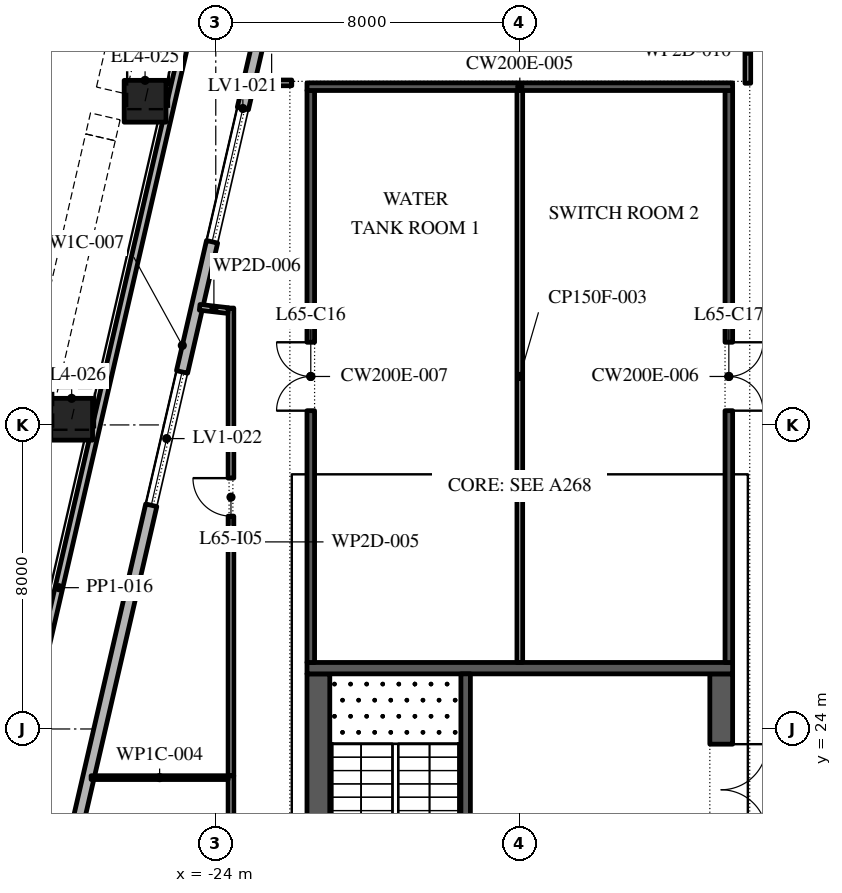
"""IFC4 building model, lengths in metres.
Left out: names, types, materials, properties, quantities, classifications, styles, units other than length and angle.
Written with IfcOpenShell. Run it as: python <this file> out.ifc"""

import sys

from ifc_helpers import new_model, si_unit, direction, frame, frame_2d, origin, origin_2d, place, context, subcontext, project, spatial, rectangle, extrude, element, fill, save


model = new_model("IFC4")
c1 = context("Model", 3, precision=1e-05, world=origin(), true_north=direction((0.0, 1.0)))
c2 = subcontext(c1, "Body", "Model", "MODEL_VIEW")
j1 = project(units=[si_unit("LENGTHUNIT", "METRE"), si_unit("PLANEANGLEUNIT", "RADIAN")], contexts=[c1])
p1 = place(None, origin())
s1 = spatial("IfcSite", under=j1, at=p1, CompositionType="ELEMENT")
p2 = place(p1, origin())
s2 = spatial("IfcBuilding", under=s1, at=p2, CompositionType="ELEMENT")
p3 = place(p2, frame((0.0, 0.0, 297.6)))
s3 = spatial("IfcBuildingStorey", under=s2, at=p3, CompositionType="ELEMENT", Elevation=297.6)
p4 = place(p3, frame((-25.86, 40.517, 0.0), z_axis=(0.014572775968, 0.063163734844, 0.997896776626), x_axis=(-0.974402924741, 0.22480867478, 0.0)))
e1 = element("IfcColumn", 1, at=p4, inside=s3, PredefinedType="COLUMN", context=c2, shape_type="SweptSolid", body=[
    extrude(rectangle(XDim=1.1, YDim=1.1, at=origin_2d()), origin(), (0.0, 0.0, 1.0), 5.411),
])
p5 = place(p3, frame((-27.792, 32.15, 0.0), z_axis=(0.011648990657, 0.050569261768, 0.998652617671), x_axis=(-0.974479105773, 0.22447822258, 0.0)))
e2 = element("IfcColumn", 2, at=p5, inside=s3, PredefinedType="COLUMN", context=c2, shape_type="SweptSolid", body=[
    extrude(rectangle(XDim=1.1, YDim=1.1, at=origin_2d()), origin(), (0.0, 0.0, 1.0), 5.407),
])
p6 = place(p3, frame((29.616, 40.758, 0.0), z_axis=(0.0, 0.0, 1.0), x_axis=(-0.974370532314, 0.224949029246, 0.0)))
e3 = element("IfcWall", 3, at=p6, inside=s3, PredefinedType="STANDARD", context=c2, shape_type="SweptSolid", body=[
    extrude(rectangle(XDim=48.0, YDim=0.3, at=frame_2d((24.0, 0.0))), origin(), (0.0, 0.0, 1.0), 4.95),
])
p7 = place(p6, frame((2.075, 0.0, 0.6)))
e4 = element("IfcOpeningElement", 4, at=p7, cuts=e3, PredefinedType="OPENING", context=c2, shape_type="SweptSolid", body=[
    extrude(rectangle(XDim=3.6, YDim=3.9, at=frame_2d((1.8, 1.95))), frame((0.0, 0.16, 0.0), z_axis=(0.0, -1.0, 0.0), x_axis=(1.0, 0.0, 0.0)), (0.0, 0.0, 1.0), 0.32),
])
p8 = place(p6, frame((9.975, 0.0, 0.6)))
e5 = element("IfcOpeningElement", 5, at=p8, cuts=e3, PredefinedType="OPENING", context=c2, shape_type="SweptSolid", body=[
    extrude(rectangle(XDim=3.6, YDim=3.55, at=frame_2d((1.8, 1.775))), frame((0.0, 0.16, 0.0), z_axis=(0.0, -1.0, 0.0), x_axis=(1.0, 0.0, 0.0)), (0.0, 0.0, 1.0), 0.32),
])
p9 = place(p6, frame((18.025, 0.0, 0.6)))
e6 = element("IfcOpeningElement", 6, at=p9, cuts=e3, PredefinedType="OPENING", context=c2, shape_type="SweptSolid", body=[
    extrude(rectangle(XDim=3.6, YDim=3.55, at=frame_2d((1.8, 1.775))), frame((0.0, 0.16, 0.0), z_axis=(0.0, -1.0, 0.0), x_axis=(1.0, 0.0, 0.0)), (0.0, 0.0, 1.0), 0.32),
])
p10 = place(p6, frame((26.075, 0.0, 0.6)))
e7 = element("IfcOpeningElement", 7, at=p10, cuts=e3, PredefinedType="OPENING", context=c2, shape_type="SweptSolid", body=[
    extrude(rectangle(XDim=3.6, YDim=3.9, at=frame_2d((1.8, 1.95))), frame((0.0, 0.16, 0.0), z_axis=(0.0, -1.0, 0.0), x_axis=(1.0, 0.0, 0.0)), (0.0, 0.0, 1.0), 0.32),
])
p11 = place(p6, frame((34.125, 0.0, 0.6)))
e8 = element("IfcOpeningElement", 8, at=p11, cuts=e3, PredefinedType="OPENING", context=c2, shape_type="SweptSolid", body=[
    extrude(rectangle(XDim=3.6, YDim=3.55, at=frame_2d((1.8, 1.775))), frame((0.0, 0.16, 0.0), z_axis=(0.0, -1.0, 0.0), x_axis=(1.0, 0.0, 0.0)), (0.0, 0.0, 1.0), 0.32),
])
p12 = place(p6, frame((42.175, 0.0, 0.6)))
e9 = element("IfcOpeningElement", 9, at=p12, cuts=e3, PredefinedType="OPENING", context=c2, shape_type="SweptSolid", body=[
    extrude(rectangle(XDim=3.6, YDim=3.9, at=frame_2d((1.8, 1.95))), frame((0.0, 0.16, 0.0), z_axis=(0.0, -1.0, 0.0), x_axis=(1.0, 0.0, 0.0)), (0.0, 0.0, 1.0), 0.32),
])
p13 = place(p3, frame((-21.359, 48.678, 0.0), z_axis=(0.0, 0.0, 1.0), x_axis=(-0.224949219336, -0.974370488428, 0.0)))
e10 = element("IfcWall", 10, at=p13, inside=s3, PredefinedType="STANDARD", context=c2, shape_type="SweptSolid", body=[
    extrude(rectangle(XDim=30.011, YDim=0.3, at=frame_2d((15.006, 0.0))), origin(), (0.0, 0.0, 1.0), 4.95),
])
p14 = place(p13, frame((1.607, 0.0, 0.6)))
e11 = element("IfcOpeningElement", 11, at=p14, cuts=e10, PredefinedType="OPENING", context=c2, shape_type="SweptSolid", body=[
    extrude(rectangle(XDim=3.6, YDim=3.9, at=frame_2d((1.8, 1.95))), frame((0.0, 0.16, 0.0), z_axis=(0.0, -1.0, 0.0), x_axis=(1.0, 0.0, 0.0)), (0.0, 0.0, 1.0), 0.32),
])
p15 = place(p13, frame((8.571, 0.0, 0.6)))
e12 = element("IfcOpeningElement", 12, at=p15, cuts=e10, PredefinedType="OPENING", context=c2, shape_type="SweptSolid", body=[
    extrude(rectangle(XDim=3.6, YDim=3.9, at=frame_2d((1.8, 1.95))), frame((0.0, 0.16, 0.0), z_axis=(0.0, -1.0, 0.0), x_axis=(1.0, 0.0, 0.0)), (0.0, 0.0, 1.0), 0.32),
])
p16 = place(p13, frame((15.686, 0.0, 0.6)))
e13 = element("IfcOpeningElement", 13, at=p16, cuts=e10, PredefinedType="OPENING", context=c2, shape_type="SweptSolid", body=[
    extrude(rectangle(XDim=3.6, YDim=3.9, at=frame_2d((1.8, 1.95))), frame((0.0, 0.16, 0.0), z_axis=(0.0, -1.0, 0.0), x_axis=(1.0, 0.0, 0.0)), (0.0, 0.0, 1.0), 0.32),
])
p17 = place(p3, frame((-21.517, 56.35, -0.05), z_axis=(0.0, 0.0, 1.0), x_axis=(-0.224951435492, -0.97436997679, 0.0)))
e14 = element("IfcWall", 14, at=p17, inside=s3, PredefinedType="STANDARD", context=c2, shape_type="SweptSolid", body=[
    extrude(rectangle(XDim=58.769, YDim=0.2, at=frame_2d((29.385, 0.0))), origin(), (0.0, 0.0, 1.0), 1.1),
])
p18 = place(p3, frame((-21.3, -2.45, 0.0), z_axis=(0.0, 0.0, 1.0), x_axis=(0.0, 1.0, 0.0)))
e15 = element("IfcWall", 15, at=p18, inside=s3, PredefinedType="SHEAR", context=c2, shape_type="SweptSolid", body=[
    extrude(rectangle(XDim=27.9, YDim=0.6, at=frame_2d((13.95, 0.0))), origin(), (0.0, 0.0, 1.0), 4.95),
])
p19 = place(p18, frame((5.05, 0.0, 0.0)))
e16 = element("IfcOpeningElement", 16, at=p19, cuts=e15, PredefinedType="OPENING", context=c2, shape_type="SweptSolid", body=[
    extrude(rectangle(XDim=1.2, YDim=2.1, at=frame_2d((0.6, 1.05))), frame((0.0, 0.31, 0.0), z_axis=(0.0, -1.0, 0.0), x_axis=(1.0, 0.0, 0.0)), (0.0, 0.0, 1.0), 0.62),
])
p20 = place(p18, frame((21.65, 0.0, 0.0)))
e17 = element("IfcOpeningElement", 17, at=p20, cuts=e15, PredefinedType="OPENING", context=c2, shape_type="SweptSolid", body=[
    extrude(rectangle(XDim=1.2, YDim=2.1, at=frame_2d((0.6, 1.05))), frame((0.0, 0.31, 0.0), z_axis=(0.0, -1.0, 0.0), x_axis=(1.0, 0.0, 0.0)), (0.0, 0.0, 1.0), 0.62),
])
p21 = place(p3, frame((-10.7, -2.45, 0.0), z_axis=(0.0, 0.0, 1.0), x_axis=(0.0, 1.0, 0.0)))
e18 = element("IfcWall", 18, at=p21, inside=s3, PredefinedType="SHEAR", context=c2, shape_type="SweptSolid", body=[
    extrude(rectangle(XDim=27.9, YDim=0.6, at=frame_2d((13.95, 0.0))), origin(), (0.0, 0.0, 1.0), 4.95),
])
p22 = place(p21, frame((23.65, 0.0, 0.0)))
e19 = element("IfcOpeningElement", 19, at=p22, cuts=e18, PredefinedType="OPENING", context=c2, shape_type="SweptSolid", body=[
    extrude(rectangle(XDim=2.4, YDim=2.1, at=frame_2d((1.2, 1.05))), frame((0.0, 0.31, 0.0), z_axis=(0.0, -1.0, 0.0), x_axis=(1.0, 0.0, 0.0)), (0.0, 0.0, 1.0), 0.62),
])
p23 = place(p21, frame((0.938, 0.0, 0.0)))
e20 = element("IfcOpeningElement", 20, at=p23, cuts=e18, PredefinedType="OPENING", context=c2, shape_type="SweptSolid", body=[
    extrude(rectangle(XDim=1.8, YDim=2.4, at=frame_2d((0.9, 1.2))), frame((0.0, 0.31, 0.0), z_axis=(0.0, -1.0, 0.0), x_axis=(1.0, 0.0, 0.0)), (0.0, 0.0, 1.0), 0.62),
])
p24 = place(p21, frame((4.163, 0.0, 0.0)))
e21 = element("IfcOpeningElement", 21, at=p24, cuts=e18, PredefinedType="OPENING", context=c2, shape_type="SweptSolid", body=[
    extrude(rectangle(XDim=1.8, YDim=2.4, at=frame_2d((0.9, 1.2))), frame((0.0, 0.31, 0.0), z_axis=(0.0, -1.0, 0.0), x_axis=(1.0, 0.0, 0.0)), (0.0, 0.0, 1.0), 0.62),
])
p25 = place(p3, frame((-21.6, 25.6, 0.0), z_axis=(0.0, 0.0, 1.0), x_axis=(1.0, 0.0, 0.0)))
e22 = element("IfcWall", 22, at=p25, inside=s3, PredefinedType="SHEAR", context=c2, shape_type="SweptSolid", body=[
    extrude(rectangle(XDim=11.2, YDim=0.3, at=frame_2d((5.6, 0.0))), origin(), (0.0, 0.0, 1.0), 4.95),
])
p26 = place(p3, frame((-17.425, 19.15, 0.0), z_axis=(0.0, 0.0, 1.0), x_axis=(0.0, 1.0, 0.0)))
e23 = element("IfcWall", 23, at=p26, inside=s3, PredefinedType="SHEAR", context=c2, shape_type="SweptSolid", body=[
    extrude(rectangle(XDim=6.3, YDim=0.25, at=frame_2d((3.15, 0.0))), origin(), (0.0, 0.0, 1.0), 4.95),
])
p27 = place(p26, frame((0.05, 0.0, 0.0)))
e24 = element("IfcOpeningElement", 24, at=p27, cuts=e23, PredefinedType="OPENING", context=c2, shape_type="SweptSolid", body=[
    extrude(rectangle(XDim=1.2, YDim=2.1, at=frame_2d((0.6, 1.05))), frame((0.0, 0.135, 0.0), z_axis=(0.0, -1.0, 0.0), x_axis=(1.0, 0.0, 0.0)), (0.0, 0.0, 1.0), 0.27),
])
p28 = place(p3, frame((-21.5, 25.75, 0.0), z_axis=(0.0, 0.0, 1.0), x_axis=(0.0, 1.0, 0.0)))
e25 = element("IfcWall", 25, at=p28, inside=s3, PredefinedType="SHEAR", context=c2, shape_type="SweptSolid", body=[
    extrude(rectangle(XDim=15.05, YDim=0.2, at=frame_2d((7.525, 0.0))), origin(), (0.0, 0.0, 1.0), 4.95),
])
p29 = place(p28, frame((6.625, 0.0, 0.0)))
e26 = element("IfcOpeningElement", 26, at=p29, cuts=e25, PredefinedType="OPENING", context=c2, shape_type="SweptSolid", body=[
    extrude(rectangle(XDim=1.8, YDim=2.4, at=frame_2d((0.9, 1.2))), frame((0.0, 0.11, 0.0), z_axis=(0.0, -1.0, 0.0), x_axis=(1.0, 0.0, 0.0)), (0.0, 0.0, 1.0), 0.22),
])
p30 = place(p3, frame((-10.5, 25.75, 0.0), z_axis=(0.0, 0.0, 1.0), x_axis=(0.0, 1.0, 0.0)))
e27 = element("IfcWall", 27, at=p30, inside=s3, PredefinedType="SHEAR", context=c2, shape_type="SweptSolid", body=[
    extrude(rectangle(XDim=15.05, YDim=0.2, at=frame_2d((7.525, 0.0))), origin(), (0.0, 0.0, 1.0), 4.95),
])
p31 = place(p30, frame((6.625, 0.0, 0.0)))
e28 = element("IfcOpeningElement", 28, at=p31, cuts=e27, PredefinedType="OPENING", context=c2, shape_type="SweptSolid", body=[
    extrude(rectangle(XDim=1.8, YDim=2.4, at=frame_2d((0.9, 1.2))), frame((0.0, 0.11, 0.0), z_axis=(0.0, -1.0, 0.0), x_axis=(1.0, 0.0, 0.0)), (0.0, 0.0, 1.0), 0.22),
])
p32 = place(p3, frame((-21.6, 40.9, 0.0), z_axis=(0.0, 0.0, 1.0), x_axis=(1.0, 0.0, 0.0)))
e29 = element("IfcWall", 29, at=p32, inside=s3, PredefinedType="SHEAR", context=c2, shape_type="SweptSolid", body=[
    extrude(rectangle(XDim=11.2, YDim=0.2, at=frame_2d((5.6, 0.0))), origin(), (0.0, 0.0, 1.0), 4.95),
])
p33 = place(p3, frame((-16.0, 25.75, 0.0), z_axis=(0.0, 0.0, 1.0), x_axis=(0.0, 1.0, 0.0)))
e30 = element("IfcWall", 30, at=p33, inside=s3, PredefinedType="PARTITIONING", context=c2, shape_type="SweptSolid", body=[
    extrude(rectangle(XDim=15.05, YDim=0.15, at=frame_2d((7.525, 0.0))), origin(), (0.0, 0.0, 1.0), 4.95),
])
p34 = place(p3, frame((-23.6, 8.86, 0.0), z_axis=(0.0, 0.0, 1.0), x_axis=(0.0, 1.0, 0.0)))
e31 = element("IfcWall", 31, at=p34, inside=s3, PredefinedType="PARTITIONING", context=c2, shape_type="SweptSolid", body=[
    extrude(rectangle(XDim=13.91, YDim=0.15, at=frame_2d((6.955, 0.0))), origin(), (0.0, 0.0, 1.0), 4.95),
])
p35 = place(p34, frame((9.21, 0.0, 0.0)))
e32 = element("IfcOpeningElement", 32, at=p35, cuts=e31, PredefinedType="OPENING", context=c2, shape_type="SweptSolid", body=[
    extrude(rectangle(XDim=1.0, YDim=2.1, at=frame_2d((0.5, 1.05))), frame((0.0, 0.085, 0.0), z_axis=(0.0, -1.0, 0.0), x_axis=(1.0, 0.0, 0.0)), (0.0, 0.0, 1.0), 0.17),
])
p36 = place(p3, frame((-23.675, 22.72, 0.0), z_axis=(0.0, 0.0, 1.0), x_axis=(-1.0, 0.0, 0.0)))
e33 = element("IfcWall", 33, at=p36, inside=s3, PredefinedType="PARTITIONING", context=c2, shape_type="SweptSolid", body=[
    extrude(rectangle(XDim=3.605, YDim=0.1, at=frame_2d((1.802, 0.0))), origin(), (0.0, 0.0, 1.0), 4.95),
])
p37 = place(p3, frame((-23.6, 22.77, 0.0), z_axis=(0.0, 0.0, 1.0), x_axis=(0.0, 1.0, 0.0)))
e34 = element("IfcWall", 34, at=p37, inside=s3, PredefinedType="PARTITIONING", context=c2, shape_type="SweptSolid", body=[
    extrude(rectangle(XDim=12.305, YDim=0.15, at=frame_2d((6.152, 0.0))), origin(), (0.0, 0.0, 1.0), 4.95),
])
p38 = place(p37, frame((6.83, 0.0, 0.0)))
e35 = element("IfcOpeningElement", 35, at=p38, cuts=e34, PredefinedType="OPENING", context=c2, shape_type="SweptSolid", body=[
    extrude(rectangle(XDim=1.0, YDim=2.1, at=frame_2d((0.5, 1.05))), frame((0.0, 0.085, 0.0), z_axis=(0.0, -1.0, 0.0), x_axis=(1.0, 0.0, 0.0)), (0.0, 0.0, 1.0), 0.17),
])
p39 = place(p3, frame((-23.675, 35.009, 0.0), z_axis=(0.0, 0.0, 1.0), x_axis=(-0.99346561474, 0.11413181997, 0.0)))
e36 = element("IfcWall", 36, at=p39, inside=s3, PredefinedType="PARTITIONING", context=c2, shape_type="SweptSolid", body=[
    extrude(rectangle(XDim=0.753, YDim=0.15, at=frame_2d((0.376, 0.0))), origin(), (0.0, 0.0, 1.0), 4.95),
])
p40 = place(p3, frame((-23.06, 41.0, 0.0), z_axis=(0.0, 0.0, 1.0), x_axis=(1.0, 0.0, 0.0)))
e37 = element("IfcWall", 37, at=p40, inside=s3, PredefinedType="PARTITIONING", context=c2, shape_type="SweptSolid", body=[
    extrude(rectangle(XDim=1.06, YDim=0.15, at=frame_2d((0.53, 0.0))), origin(), (0.0, 0.0, 1.0), 4.95),
])
p41 = place(p3, frame((-10.0, 40.99, 0.0), z_axis=(0.0, 0.0, 1.0), x_axis=(0.0, 1.0, 0.0)))
e38 = element("IfcWall", 38, at=p41, inside=s3, PredefinedType="PARTITIONING", context=c2, shape_type="SweptSolid", body=[
    extrude(rectangle(XDim=1.685, YDim=0.15, at=frame_2d((0.843, 0.0))), origin(), (0.0, 0.0, 1.0), 4.95),
])
p42 = place(p15, origin())
e39 = element("IfcWindow", 39, at=p42, inside=s3, PartitioningType="DOUBLE_PANEL_HORIZONTAL", PredefinedType="WINDOW", context=c2, shape_type="SweptSolid", body=[
    extrude(rectangle(XDim=3.6, YDim=3.9, at=frame_2d((1.8, 1.95))), frame((0.0, 0.03, 0.0), z_axis=(0.0, -1.0, 0.0), x_axis=(1.0, 0.0, 0.0)), (0.0, 0.0, 1.0), 0.06),
])
fill(e12, e39)
p43 = place(p16, origin())
e40 = element("IfcWindow", 40, at=p43, inside=s3, PartitioningType="DOUBLE_PANEL_HORIZONTAL", PredefinedType="WINDOW", context=c2, shape_type="SweptSolid", body=[
    extrude(rectangle(XDim=3.6, YDim=3.9, at=frame_2d((1.8, 1.95))), frame((0.0, 0.03, 0.0), z_axis=(0.0, -1.0, 0.0), x_axis=(1.0, 0.0, 0.0)), (0.0, 0.0, 1.0), 0.06),
])
fill(e13, e40)
p44 = place(p22, frame((2.4, 0.0, 0.0), z_axis=(0.0, 0.0, 1.0), x_axis=(-1.0, 0.0, 0.0)))
e41 = element("IfcDoor", 41, at=p44, inside=s3, OperationType="DOUBLE_DOOR_SINGLE_SWING", PredefinedType="DOOR", context=c2, shape_type="SweptSolid", body=[
    extrude(rectangle(XDim=2.4, YDim=2.1, at=frame_2d((1.2, 1.05))), frame((0.0, 0.025, 0.0), z_axis=(0.0, -1.0, 0.0), x_axis=(1.0, 0.0, 0.0)), (0.0, 0.0, 1.0), 0.05),
])
fill(e19, e41)
p45 = place(p29, origin())
e42 = element("IfcDoor", 42, at=p45, inside=s3, OperationType="DOUBLE_DOOR_SINGLE_SWING", PredefinedType="DOOR", context=c2, shape_type="SweptSolid", body=[
    extrude(rectangle(XDim=1.8, YDim=2.4, at=frame_2d((0.9, 1.2))), frame((0.0, -0.05, 0.0), z_axis=(0.0, -1.0, 0.0), x_axis=(1.0, 0.0, 0.0)), (0.0, 0.0, 1.0), 0.05),
])
fill(e26, e42)
p46 = place(p31, frame((1.8, 0.15, 0.0), z_axis=(0.0, 0.0, 1.0), x_axis=(-1.0, 0.0, 0.0)))
e43 = element("IfcDoor", 43, at=p46, inside=s3, OperationType="DOUBLE_DOOR_SINGLE_SWING", PredefinedType="DOOR", context=c2, shape_type="SweptSolid", body=[
    extrude(rectangle(XDim=1.8, YDim=2.4, at=frame_2d((0.9, 1.2))), frame((0.0, 0.1, 0.0), z_axis=(0.0, -1.0, 0.0), x_axis=(1.0, 0.0, 0.0)), (0.0, 0.0, 1.0), 0.05),
])
fill(e28, e43)
p47 = place(p38, origin())
e44 = element("IfcDoor", 44, at=p47, inside=s3, OperationType="SINGLE_SWING_LEFT", PredefinedType="DOOR", context=c2, shape_type="SweptSolid", body=[
    extrude(rectangle(XDim=1.0, YDim=2.1, at=frame_2d((0.5, 1.05))), frame((0.0, 0.025, 0.0), z_axis=(0.0, -1.0, 0.0), x_axis=(1.0, 0.0, 0.0)), (0.0, 0.0, 1.0), 0.05),
])
fill(e35, e44)
save(model, sys.argv[1])
